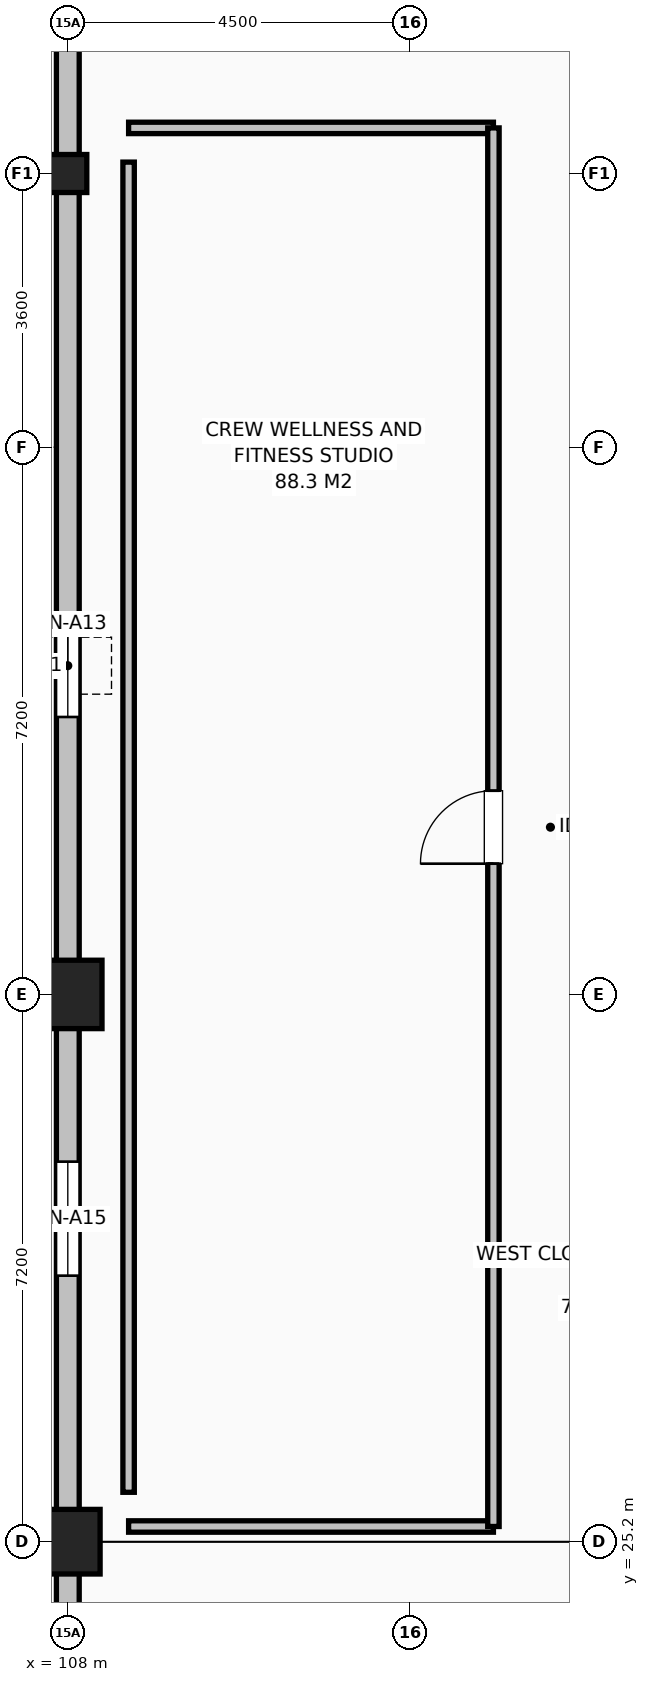
"""IFC4 building model, lengths in metres.
Left out: names, types, materials, properties, quantities, classifications, styles, units other than length and angle.
Written with IfcOpenShell. Run it as: python <this file> out.ifc"""

import sys

from ifc_helpers import new_model, si_unit, direction, frame, frame_2d, origin, origin_2d, place, context, subcontext, project, spatial, rectangle, circle, extrude, element, fill, save


model = new_model("IFC4")
c1 = context("Model", 3, precision=1e-05, world=origin(), true_north=direction((0.0, 1.0)))
c2 = subcontext(c1, "Body", "Model", "MODEL_VIEW")
j1 = project(units=[si_unit("LENGTHUNIT", "METRE"), si_unit("PLANEANGLEUNIT", "RADIAN")], contexts=[c1])
p1 = place(None, origin())
s1 = spatial("IfcSite", under=j1, at=p1, CompositionType="ELEMENT")
p2 = place(p1, origin())
s2 = spatial("IfcBuilding", under=s1, at=p2, CompositionType="ELEMENT")
p3 = place(p2, frame((0.0, 0.0, 4.8)))
s3 = spatial("IfcBuildingStorey", under=s2, at=p3, CompositionType="ELEMENT", Elevation=4.8)
p4 = place(p3, frame((108.0, 25.2, 0.0), z_axis=(0.0, 0.0, 1.0), x_axis=(1.0, 0.0, 0.0)))
e1 = element("IfcColumn", 1, at=p4, inside=s3, PredefinedType="COLUMN", context=c2, shape_type="SweptSolid", body=[
    extrude(rectangle(XDim=0.85, YDim=0.85, at=origin_2d()), origin(), (0.0, 0.0, 1.0), 4.2),
])
p5 = place(p3, frame((108.0, 32.4, 0.0), z_axis=(0.0, 0.0, 1.0), x_axis=(1.0, 0.0, 0.0)))
e2 = element("IfcColumn", 2, at=p5, inside=s3, PredefinedType="COLUMN", context=c2, shape_type="SweptSolid", body=[
    extrude(rectangle(XDim=0.9, YDim=0.9, at=origin_2d()), origin(), (0.0, 0.0, 1.0), 4.2),
])
p6 = place(p3, frame((108.0, 43.2, 0.0), z_axis=(0.0, 0.0, 1.0), x_axis=(1.0, 0.0, 0.0)))
e3 = element("IfcColumn", 3, at=p6, inside=s3, PredefinedType="COLUMN", context=c2, shape_type="SweptSolid", body=[
    extrude(circle(Radius=0.25, at=origin_2d()), origin(), (0.0, 0.0, 1.0), 4.2),
])
p7 = place(p3, frame((108.0, 54.0, 0.0), z_axis=(0.0, 0.0, 1.0), x_axis=(0.0, -1.0, 0.0)))
e4 = element("IfcWall", 4, at=p7, inside=s3, PredefinedType="SOLIDWALL", context=c2, shape_type="SweptSolid", body=[
    extrude(rectangle(XDim=43.2, YDim=0.3, at=frame_2d((21.6, 0.0))), origin(), (0.0, 0.0, 1.0), 3.5),
])
p8 = place(p7, frame((2.2, 0.0, 0.72)))
e5 = element("IfcOpeningElement", 5, at=p8, cuts=e4, PredefinedType="OPENING", context=c2, shape_type="SweptSolid", body=[
    extrude(rectangle(XDim=1.8, YDim=2.15, at=frame_2d((0.9, 1.075))), frame((0.0, 0.16, 0.0), z_axis=(0.0, -1.0, 0.0), x_axis=(1.0, 0.0, 0.0)), (0.0, 0.0, 1.0), 0.32),
])
p9 = place(p7, frame((16.6, 0.0, 0.72)))
e6 = element("IfcOpeningElement", 6, at=p9, cuts=e4, PredefinedType="OPENING", context=c2, shape_type="SweptSolid", body=[
    extrude(rectangle(XDim=1.35, YDim=2.05, at=frame_2d((0.675, 1.025))), frame((0.0, 0.16, 0.0), z_axis=(0.0, -1.0, 0.0), x_axis=(1.0, 0.0, 0.0)), (0.0, 0.0, 1.0), 0.32),
])
p10 = place(p7, frame((23.8, 0.0, 0.72)))
e7 = element("IfcOpeningElement", 7, at=p10, cuts=e4, PredefinedType="OPENING", context=c2, shape_type="SweptSolid", body=[
    extrude(rectangle(XDim=1.5, YDim=2.1, at=frame_2d((0.75, 1.05))), frame((0.0, 0.16, 0.0), z_axis=(0.0, -1.0, 0.0), x_axis=(1.0, 0.0, 0.0)), (0.0, 0.0, 1.0), 0.32),
])
p11 = place(p7, frame((31.0, 0.0, 0.72)))
e8 = element("IfcOpeningElement", 8, at=p11, cuts=e4, PredefinedType="OPENING", context=c2, shape_type="SweptSolid", body=[
    extrude(rectangle(XDim=1.65, YDim=2.1, at=frame_2d((0.825, 1.05))), frame((0.0, 0.16, 0.0), z_axis=(0.0, -1.0, 0.0), x_axis=(1.0, 0.0, 0.0)), (0.0, 0.0, 1.0), 0.32),
])
p12 = place(p3, frame((108.8, 43.8, 0.0), z_axis=(0.0, 0.0, 1.0), x_axis=(1.0, 0.0, 0.0)))
e9 = element("IfcWall", 9, at=p12, inside=s3, PredefinedType="PARTITIONING", context=c2, shape_type="SweptSolid", body=[
    extrude(rectangle(XDim=4.8, YDim=0.15, at=frame_2d((2.4, 0.0))), origin(), (0.0, 0.0, 1.0), 3.6),
])
p13 = place(p3, frame((113.6, 25.4, 0.0), z_axis=(0.0, 0.0, 1.0), x_axis=(-1.0, 0.0, 0.0)))
e10 = element("IfcWall", 10, at=p13, inside=s3, PredefinedType="PARTITIONING", context=c2, shape_type="SweptSolid", body=[
    extrude(rectangle(XDim=4.8, YDim=0.15, at=frame_2d((2.4, 0.0))), origin(), (0.0, 0.0, 1.0), 3.122),
])
p14 = place(p3, frame((108.8, 43.35, 0.0), z_axis=(0.0, 0.0, 1.0), x_axis=(0.0, -1.0, 0.0)))
e11 = element("IfcWall", 11, at=p14, inside=s3, PredefinedType="PARTITIONING", context=c2, shape_type="SweptSolid", body=[
    extrude(rectangle(XDim=17.5, YDim=0.15, at=frame_2d((8.75, 0.0))), origin(), (0.0, 0.0, 1.0), 3.157),
])
p15 = place(p3, frame((113.6, 25.4, 0.0), z_axis=(0.0, 0.0, 1.0), x_axis=(0.0, 1.0, 0.0)))
e12 = element("IfcWall", 12, at=p15, inside=s3, PredefinedType="PARTITIONING", context=c2, shape_type="SweptSolid", body=[
    extrude(rectangle(XDim=18.4, YDim=0.15, at=frame_2d((9.2, 0.0))), origin(), (0.0, 0.0, 1.0), 3.122),
])
p16 = place(p15, frame((8.72, 0.0, 0.0)))
e13 = element("IfcOpeningElement", 13, at=p16, cuts=e12, PredefinedType="OPENING", context=c2, shape_type="SweptSolid", body=[
    extrude(rectangle(XDim=0.96, YDim=2.15, at=frame_2d((0.48, 1.075))), frame((0.0, 0.085, 0.0), z_axis=(0.0, -1.0, 0.0), x_axis=(1.0, 0.0, 0.0)), (0.0, 0.0, 1.0), 0.17),
])
p17 = place(p9, origin())
e14 = element("IfcWindow", 14, at=p17, inside=s3, PartitioningType="SINGLE_PANEL", PredefinedType="WINDOW", context=c2, shape_type="SweptSolid", body=[
    extrude(rectangle(XDim=1.35, YDim=2.05, at=frame_2d((0.675, 1.025))), frame((0.0, 0.03, 0.0), z_axis=(0.0, -1.0, 0.0), x_axis=(1.0, 0.0, 0.0)), (0.0, 0.0, 1.0), 0.06),
])
fill(e6, e14)
p18 = place(p10, origin())
e15 = element("IfcWindow", 15, at=p18, inside=s3, PartitioningType="SINGLE_PANEL", PredefinedType="WINDOW", context=c2, shape_type="SweptSolid", body=[
    extrude(rectangle(XDim=1.5, YDim=2.1, at=frame_2d((0.75, 1.05))), frame((0.0, 0.03, 0.0), z_axis=(0.0, -1.0, 0.0), x_axis=(1.0, 0.0, 0.0)), (0.0, 0.0, 1.0), 0.06),
])
fill(e7, e15)
p19 = place(p16, origin())
e16 = element("IfcDoor", 16, at=p19, inside=s3, OperationType="SINGLE_SWING_LEFT", PredefinedType="DOOR", context=c2, shape_type="SweptSolid", body=[
    extrude(rectangle(XDim=0.96, YDim=2.15, at=frame_2d((0.48, 1.075))), frame((0.0, 0.025, 0.0), z_axis=(0.0, -1.0, 0.0), x_axis=(1.0, 0.0, 0.0)), (0.0, 0.0, 1.0), 0.05),
])
fill(e13, e16)
save(model, sys.argv[1])
